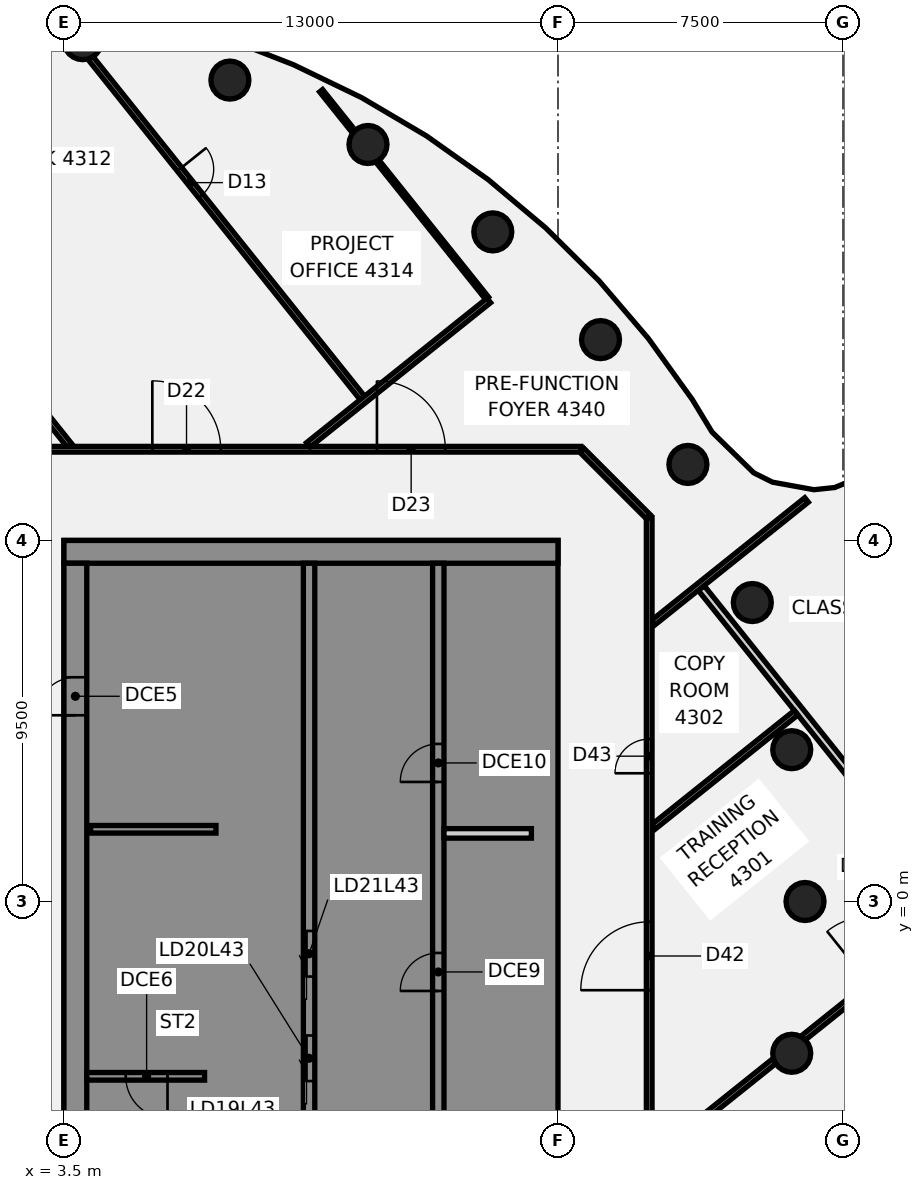
"""IFC4 building model, lengths in metres.
Left out: names, types, materials, properties, quantities, classifications, styles, units other than length and angle.
Written with IfcOpenShell. Run it as: python <this file> out.ifc"""

import sys

from ifc_helpers import new_model, si_unit, direction, frame, frame_2d, origin, origin_2d, place, context, subcontext, project, spatial, polyline, rectangle, circle, outline, extrude, element, fill, save


model = new_model("IFC4")
c1 = context("Model", 3, precision=1e-05, world=origin(), true_north=direction((0.0, 1.0)))
c2 = subcontext(c1, "Body", "Model", "MODEL_VIEW")
j1 = project(units=[si_unit("LENGTHUNIT", "METRE"), si_unit("PLANEANGLEUNIT", "RADIAN")], contexts=[c1])
p1 = place(None, origin())
s1 = spatial("IfcSite", under=j1, at=p1, CompositionType="ELEMENT")
p2 = place(p1, origin())
s2 = spatial("IfcBuilding", under=s1, at=p2, CompositionType="ELEMENT")
p3 = place(p2, frame((0.0, 0.0, 174.25)))
s3 = spatial("IfcBuildingStorey", under=s2, at=p3, CompositionType="ELEMENT", Elevation=174.25)
for number, where, z_axis, x_axis in (
    (1, (23.0, 0.0, -0.14), (0.0, 0.0, 1.0), (1.0, 0.0, 0.0)),
    (2, (22.651, 3.994, -0.14), (0.0, 0.0, 1.0), (1.0, 0.0, 0.0)),
    (3, (21.613, 7.866, -0.14), (0.0, 0.0, 1.0), (1.0, 0.0, 0.0)),
    (4, (19.919, 11.5, -0.14), (0.0, 0.0, 1.0), (1.0, 0.0, 0.0)),
    (5, (17.619, 14.784, -0.14), (0.0, 0.0, 1.0), (1.0, 0.0, 0.0)),
    (6, (14.784, 17.619, -0.14), (0.0, 0.0, 1.0), (1.0, 0.0, 0.0)),
    (7, (11.5, 19.919, -0.14), (0.0, 0.0, 1.0), (1.0, 0.0, 0.0)),
    (8, (7.866, 21.613, -0.14), (0.0, 0.0, 1.0), (1.0, 0.0, 0.0)),
    (9, (3.994, 22.651, -0.14), (0.0, 0.0, 1.0), (1.0, 0.0, 0.0)),
    (10, (22.651, -3.994, -0.14), (0.0, 0.0, 1.0), (1.0, 0.0, 0.0)),
):
    element("IfcColumn", number, at=place(p3, frame(where, z_axis=z_axis, x_axis=x_axis)), inside=s3, PredefinedType="COLUMN", context=c2, shape_type="SweptSolid", body=[
        extrude(circle(Radius=0.5, at=origin_2d()), origin(), (0.0, 0.0, 1.0), 3.71),
    ])
p4 = place(p3, frame((-3.479, 20.906, 0.0), z_axis=(0.0, 0.0, 1.0), x_axis=(0.624627130609, -0.780923138155, 0.0)))
e11 = element("IfcWall", 11, at=p4, inside=s3, PredefinedType="PARTITIONING", context=c2, shape_type="SweptSolid", body=[
    extrude(rectangle(XDim=11.398, YDim=0.15, at=frame_2d((5.699, 0.0))), origin(), (0.0, 0.0, 1.0), 2.97),
])
p5 = place(p4, frame((6.82, 0.0, 0.0)))
e12 = element("IfcOpeningElement", 12, at=p5, cuts=e11, PredefinedType="OPENING", context=c2, shape_type="SweptSolid", body=[
    extrude(rectangle(XDim=0.9, YDim=2.1, at=frame_2d((0.45, 1.05))), frame((0.0, 0.085, 0.0), z_axis=(0.0, -1.0, 0.0), x_axis=(1.0, 0.0, 0.0)), (0.0, 0.0, 1.0), 0.17),
])
p6 = place(p3, frame((4.037, 22.396, 0.0), z_axis=(0.0, 0.0, 1.0), x_axis=(0.624628926241, -0.780921701903, 0.0)))
e13 = element("IfcWall", 13, at=p6, inside=s3, PredefinedType="PARTITIONING", context=c2, shape_type="SweptSolid", body=[
    extrude(rectangle(XDim=11.708, YDim=0.15, at=frame_2d((5.854, 0.0))), origin(), (0.0, 0.0, 1.0), 2.97),
])
p7 = place(p6, frame((4.007, 0.0, 0.0)))
e14 = element("IfcOpeningElement", 14, at=p7, cuts=e13, PredefinedType="OPENING", context=c2, shape_type="SweptSolid", body=[
    extrude(rectangle(XDim=0.9, YDim=2.1, at=frame_2d((0.45, 1.05))), frame((0.0, 0.085, 0.0), z_axis=(0.0, -1.0, 0.0), x_axis=(1.0, 0.0, 0.0)), (0.0, 0.0, 1.0), 0.17),
])
p8 = place(p3, frame((10.266, 21.333, 0.0), z_axis=(0.0, 0.0, 1.0), x_axis=(0.62463072699, -0.780920261551, 0.0)))
e15 = element("IfcWall", 15, at=p8, inside=s3, PredefinedType="PARTITIONING", context=c2, shape_type="SweptSolid", body=[
    extrude(rectangle(XDim=1.389, YDim=0.1, at=frame_2d((0.694, 0.0))), origin(), (0.0, 0.0, 1.0), 2.97),
])
p9 = place(p3, frame((11.752, 19.476, 0.0), z_axis=(0.0, 0.0, 1.0), x_axis=(0.624636960835, -0.780915275276, 0.0)))
e16 = element("IfcWall", 16, at=p9, inside=s3, PredefinedType="PARTITIONING", context=c2, shape_type="SweptSolid", body=[
    extrude(rectangle(XDim=4.613, YDim=0.1, at=frame_2d((2.307, 0.0))), origin(), (0.0, 0.0, 1.0), 2.97),
])
p10 = place(p3, frame((20.27, 8.247, 0.0), z_axis=(0.0, 0.0, 1.0), x_axis=(0.624684578179, -0.780877184828, 0.0)))
e17 = element("IfcWall", 17, at=p10, inside=s3, PredefinedType="PARTITIONING", context=c2, shape_type="SweptSolid", body=[
    extrude(rectangle(XDim=14.219, YDim=0.2, at=frame_2d((7.11, 0.0))), origin(), (0.0, 0.0, 1.0), 2.87),
])
p11 = place(p10, frame((6.92, 0.0, 0.0)))
e18 = element("IfcOpeningElement", 18, at=p11, cuts=e17, PredefinedType="OPENING", context=c2, shape_type="SweptSolid", body=[
    extrude(rectangle(XDim=1.4, YDim=2.1, at=frame_2d((0.7, 1.05))), frame((0.0, 0.11, 0.0), z_axis=(0.0, -1.0, 0.0), x_axis=(1.0, 0.0, 0.0)), (0.0, 0.0, 1.0), 0.22),
])
p12 = place(p3, frame((17.128, 11.872, 0.0), z_axis=(0.0, 0.0, 1.0), x_axis=(0.707106781187, -0.707106781187, 0.0)))
e19 = element("IfcWall", 19, at=p12, inside=s3, PredefinedType="PARTITIONING", context=c2, shape_type="SweptSolid", body=[
    extrude(rectangle(XDim=2.465, YDim=0.15, at=frame_2d((1.232, 0.0))), origin(), (0.0, 0.0, 1.0), 2.97),
])
p13 = place(p3, frame((-17.065, 11.9, 0.0), z_axis=(0.0, 0.0, 1.0), x_axis=(1.0, 0.0, 0.0)))
e20 = element("IfcWall", 20, at=p13, inside=s3, PredefinedType="PARTITIONING", context=c2, shape_type="SweptSolid", body=[
    extrude(rectangle(XDim=34.165, YDim=0.15, at=frame_2d((17.083, 0.0))), origin(), (0.0, 0.0, 1.0), 2.97),
])
p14 = place(p13, frame((22.89, 0.0, 0.0)))
e21 = element("IfcOpeningElement", 21, at=p14, cuts=e20, PredefinedType="OPENING", context=c2, shape_type="SweptSolid", body=[
    extrude(rectangle(XDim=1.8, YDim=2.1, at=frame_2d((0.9, 1.05))), frame((0.0, 0.085, 0.0), z_axis=(0.0, -1.0, 0.0), x_axis=(1.0, 0.0, 0.0)), (0.0, 0.0, 1.0), 0.17),
])
p15 = place(p13, frame((28.801, 0.0, 0.0)))
e22 = element("IfcOpeningElement", 22, at=p15, cuts=e20, PredefinedType="OPENING", context=c2, shape_type="SweptSolid", body=[
    extrude(rectangle(XDim=1.8, YDim=2.1, at=frame_2d((0.9, 1.05))), frame((0.0, 0.085, 0.0), z_axis=(0.0, -1.0, 0.0), x_axis=(1.0, 0.0, 0.0)), (0.0, 0.0, 1.0), 0.17),
])
p16 = place(p13, frame((8.574, 0.0, 0.0)))
e23 = element("IfcOpeningElement", 23, at=p16, cuts=e20, PredefinedType="OPENING", context=c2, shape_type="SweptSolid", body=[
    extrude(rectangle(XDim=1.8, YDim=2.1, at=frame_2d((0.9, 1.05))), frame((0.0, 0.085, 0.0), z_axis=(0.0, -1.0, 0.0), x_axis=(1.0, 0.0, 0.0)), (0.0, 0.0, 1.0), 0.17),
])
p17 = place(p3, frame((9.93, 12.016, 0.0), z_axis=(0.0, 0.0, 1.0), x_axis=(0.780892305739, 0.624665676052, 0.0)))
e24 = element("IfcWall", 24, at=p17, inside=s3, PredefinedType="PARTITIONING", context=c2, shape_type="SweptSolid", body=[
    extrude(rectangle(XDim=6.082, YDim=0.15, at=frame_2d((3.041, 0.0))), origin(), (0.0, 0.0, 1.0), 2.97),
])
p18 = place(p3, frame((19.005, -6.75, 0.0), z_axis=(0.0, 0.0, 1.0), x_axis=(0.780862978875, 0.624702335694, 0.0)))
e25 = element("IfcWall", 25, at=p18, inside=s3, PredefinedType="PARTITIONING", context=c2, shape_type="SweptSolid", body=[
    extrude(rectangle(XDim=4.085, YDim=0.15, at=frame_2d((2.042, 0.0))), origin(), (0.0, 0.0, 1.0), 2.97),
])
p19 = place(p3, frame((22.948, -3.595, 0.0), z_axis=(0.0, 0.0, 1.0), x_axis=(0.780855081302, 0.624712207344, 0.0)))
e26 = element("IfcWall", 26, at=p19, inside=s3, PredefinedType="PARTITIONING", context=c2, shape_type="SweptSolid", body=[
    extrude(rectangle(XDim=5.205, YDim=0.15, at=frame_2d((2.603, 0.0))), origin(), (0.0, 0.0, 1.0), 2.97),
])
p20 = place(p19, frame((2.25, 0.0, 0.0)))
e27 = element("IfcOpeningElement", 27, at=p20, cuts=e26, PredefinedType="OPENING", context=c2, shape_type="SweptSolid", body=[
    extrude(rectangle(XDim=1.8, YDim=2.1, at=frame_2d((0.9, 1.05))), frame((0.0, 0.085, 0.0), z_axis=(0.0, -1.0, 0.0), x_axis=(1.0, 0.0, 0.0)), (0.0, 0.0, 1.0), 0.17),
])
p21 = place(p3, frame((19.005, 1.958, 0.0), z_axis=(0.0, 0.0, 1.0), x_axis=(0.780878701352, 0.624682682468, 0.0)))
e28 = element("IfcWall", 28, at=p21, inside=s3, PredefinedType="PARTITIONING", context=c2, shape_type="SweptSolid", body=[
    extrude(rectangle(XDim=4.816, YDim=0.15, at=frame_2d((2.408, 0.0))), origin(), (0.0, 0.0, 1.0), 2.87),
])
p22 = place(p3, frame((19.005, 7.337, 0.0), z_axis=(0.0, 0.0, 1.0), x_axis=(0.780882638199, 0.624677761217, 0.0)))
e29 = element("IfcWall", 29, at=p22, inside=s3, PredefinedType="PARTITIONING", context=c2, shape_type="SweptSolid", body=[
    extrude(rectangle(XDim=5.167, YDim=0.15, at=frame_2d((2.583, 0.0))), origin(), (0.0, 0.0, 1.0), 2.97),
])
p23 = place(p3, frame((18.9, -10.1, 0.0), z_axis=(0.0, 0.0, 1.0), x_axis=(0.0, 1.0, 0.0)))
e30 = element("IfcWall", 30, at=p23, inside=s3, PredefinedType="PARTITIONING", context=c2, shape_type="SweptSolid", body=[
    extrude(rectangle(XDim=20.2, YDim=0.15, at=frame_2d((10.1, 0.0))), origin(), (0.0, 0.0, 1.0), 2.97),
])
p24 = place(p23, frame((7.766, 0.0, 0.0)))
e31 = element("IfcOpeningElement", 31, at=p24, cuts=e30, PredefinedType="OPENING", context=c2, shape_type="SweptSolid", body=[
    extrude(rectangle(XDim=1.8, YDim=2.1, at=frame_2d((0.9, 1.05))), frame((0.0, 0.085, 0.0), z_axis=(0.0, -1.0, 0.0), x_axis=(1.0, 0.0, 0.0)), (0.0, 0.0, 1.0), 0.17),
])
p25 = place(p23, frame((13.474, 0.0, 0.0)))
e32 = element("IfcOpeningElement", 32, at=p25, cuts=e30, PredefinedType="OPENING", context=c2, shape_type="SweptSolid", body=[
    extrude(rectangle(XDim=0.9, YDim=2.1, at=frame_2d((0.45, 1.05))), frame((0.0, 0.085, 0.0), z_axis=(0.0, -1.0, 0.0), x_axis=(1.0, 0.0, 0.0)), (0.0, 0.0, 1.0), 0.17),
])
p26 = place(p3, origin())
e33 = element("IfcWall", 33, at=p26, inside=s3, PredefinedType="SHEAR", context=c2, shape_type="SweptSolid", body=[
    extrude(outline(polyline([(13.5, -8.125), (13.5, -8.9), (15.9, -8.9), (16.5, -8.9), (16.5, 8.9), (15.9, 8.9), (13.5, 8.9), (13.5, 8.125), (15.9, 8.125), (15.9, 5.625), (13.5, 5.625), (13.5, 5.375), (15.9, 5.375), (15.9, -5.375), (13.5, -5.375), (13.5, -5.625), (15.9, -5.625), (15.9, -8.125), (13.5, -8.125)])), origin(), (0.0, 0.0, 1.0), 3.57),
])
p27 = place(p3, frame((16.5, 9.2, 0.0), z_axis=(0.0, 0.0, 1.0), x_axis=(-1.0, 0.0, 0.0)))
e34 = element("IfcWall", 34, at=p27, inside=s3, PredefinedType="SHEAR", context=c2, shape_type="SweptSolid", body=[
    extrude(rectangle(XDim=13.0, YDim=0.6, at=frame_2d((6.5, 0.0))), origin(), (0.0, 0.0, 1.0), 3.57),
])
p28 = place(p3, origin())
e35 = element("IfcWall", 35, at=p28, inside=s3, PredefinedType="SHEAR", context=c2, shape_type="SweptSolid", body=[
    extrude(outline(polyline([(9.8, -5.375), (7.5, -5.375), (7.5, -2.875), (9.8, -2.875), (9.8, -2.625), (7.5, -2.625), (7.5, -0.125), (9.8, -0.125), (9.8, 0.125), (7.5, 0.125), (7.5, 2.625), (9.8, 2.625), (9.8, 2.875), (7.5, 2.875), (7.5, 5.375), (9.8, 5.375), (9.8, 5.625), (7.5, 5.625), (7.5, 8.125), (9.8, 8.125), (9.8, 8.9), (7.5, 8.9), (7.2, 8.9), (7.2, -5.625), (7.5, -5.625), (9.8, -5.625), (9.8, -5.375)])), origin(), (0.0, 0.0, 1.0), 3.57),
])
p29 = place(p3, frame((7.5, 1.9, 0.0), z_axis=(0.0, 0.0, 1.0), x_axis=(-1.0, 0.0, 0.0)))
e36 = element("IfcWall", 36, at=p29, inside=s3, PredefinedType="SHEAR", context=c2, shape_type="SweptSolid", body=[
    extrude(rectangle(XDim=3.3, YDim=0.2, at=frame_2d((1.65, 0.0))), origin(), (0.0, 0.0, 1.0), 3.57),
])
p30 = place(p3, frame((13.35, -8.9, 0.0), z_axis=(0.0, 0.0, 1.0), x_axis=(0.0, 1.0, 0.0)))
e37 = element("IfcWall", 37, at=p30, inside=s3, PredefinedType="SHEAR", context=c2, shape_type="SweptSolid", body=[
    extrude(rectangle(XDim=17.8, YDim=0.3, at=frame_2d((8.9, 0.0))), origin(), (0.0, 0.0, 1.0), 3.57),
])
p31 = place(p30, frame((1.325, 0.0, 0.0)))
e38 = element("IfcOpeningElement", 38, at=p31, cuts=e37, PredefinedType="OPENING", context=c2, shape_type="SweptSolid", body=[
    extrude(rectangle(XDim=1.4, YDim=2.1, at=frame_2d((0.7, 1.05))), frame((0.0, 0.16, 0.0), z_axis=(0.0, -1.0, 0.0), x_axis=(1.0, 0.0, 0.0)), (0.0, 0.0, 1.0), 0.32),
])
p32 = place(p30, frame((6.546, 0.0, 0.0)))
e39 = element("IfcOpeningElement", 39, at=p32, cuts=e37, PredefinedType="OPENING", context=c2, shape_type="SweptSolid", body=[
    extrude(rectangle(XDim=1.0, YDim=2.1, at=frame_2d((0.5, 1.05))), frame((0.0, 0.16, 0.0), z_axis=(0.0, -1.0, 0.0), x_axis=(1.0, 0.0, 0.0)), (0.0, 0.0, 1.0), 0.32),
])
p33 = place(p30, frame((12.046, 0.0, 0.0)))
e40 = element("IfcOpeningElement", 40, at=p33, cuts=e37, PredefinedType="OPENING", context=c2, shape_type="SweptSolid", body=[
    extrude(rectangle(XDim=1.0, YDim=2.1, at=frame_2d((0.5, 1.05))), frame((0.0, 0.16, 0.0), z_axis=(0.0, -1.0, 0.0), x_axis=(1.0, 0.0, 0.0)), (0.0, 0.0, 1.0), 0.32),
])
p34 = place(p3, frame((9.95, -8.9, 0.0), z_axis=(0.0, 0.0, 1.0), x_axis=(0.0, 1.0, 0.0)))
e41 = element("IfcWall", 41, at=p34, inside=s3, PredefinedType="SHEAR", context=c2, shape_type="SweptSolid", body=[
    extrude(rectangle(XDim=17.8, YDim=0.3, at=frame_2d((8.9, 0.0))), origin(), (0.0, 0.0, 1.0), 3.57),
])
p35 = place(p34, frame((4.175, 0.0, 0.0)))
e42 = element("IfcOpeningElement", 42, at=p35, cuts=e41, PredefinedType="OPENING", context=c2, shape_type="SweptSolid", body=[
    extrude(rectangle(XDim=1.2, YDim=2.1, at=frame_2d((0.6, 1.05))), frame((0.0, 0.16, 0.0), z_axis=(0.0, -1.0, 0.0), x_axis=(1.0, 0.0, 0.0)), (0.0, 0.0, 1.0), 0.32),
])
p36 = place(p34, frame((6.925, 0.0, 0.0)))
e43 = element("IfcOpeningElement", 43, at=p36, cuts=e41, PredefinedType="OPENING", context=c2, shape_type="SweptSolid", body=[
    extrude(rectangle(XDim=1.2, YDim=2.1, at=frame_2d((0.6, 1.05))), frame((0.0, 0.16, 0.0), z_axis=(0.0, -1.0, 0.0), x_axis=(1.0, 0.0, 0.0)), (0.0, 0.0, 1.0), 0.32),
])
p37 = place(p3, frame((3.8, -8.9, 0.0), z_axis=(0.0, 0.0, 1.0), x_axis=(0.0, 1.0, 0.0)))
e44 = element("IfcWall", 44, at=p37, inside=s3, PredefinedType="SHEAR", context=c2, shape_type="SweptSolid", body=[
    extrude(rectangle(XDim=17.8, YDim=0.6, at=frame_2d((8.9, 0.0))), origin(), (0.0, 0.0, 1.0), 3.57),
])
p38 = place(p37, frame((1.25, 0.0, 0.0)))
e45 = element("IfcOpeningElement", 45, at=p38, cuts=e44, PredefinedType="OPENING", context=c2, shape_type="SweptSolid", body=[
    extrude(rectangle(XDim=1.8, YDim=2.1, at=frame_2d((0.9, 1.05))), frame((0.0, 0.31, 0.0), z_axis=(0.0, -1.0, 0.0), x_axis=(1.0, 0.0, 0.0)), (0.0, 0.0, 1.0), 0.62),
])
p39 = place(p37, frame((13.8, 0.0, 0.0)))
e46 = element("IfcOpeningElement", 46, at=p39, cuts=e44, PredefinedType="OPENING", context=c2, shape_type="SweptSolid", body=[
    extrude(rectangle(XDim=1.0, YDim=2.1, at=frame_2d((0.5, 1.05))), frame((0.0, 0.31, 0.0), z_axis=(0.0, -1.0, 0.0), x_axis=(1.0, 0.0, 0.0)), (0.0, 0.0, 1.0), 0.62),
])
p40 = place(p3, frame((7.2, -4.6, 0.0), z_axis=(0.0, 0.0, 1.0), x_axis=(-1.0, 0.0, 0.0)))
e47 = element("IfcWall", 47, at=p40, inside=s3, PredefinedType="SHEAR", context=c2, shape_type="SweptSolid", body=[
    extrude(rectangle(XDim=3.1, YDim=0.2, at=frame_2d((1.55, 0.0))), origin(), (0.0, 0.0, 1.0), 3.57),
])
p41 = place(p40, frame((0.975, 0.0, 0.0)))
e48 = element("IfcOpeningElement", 48, at=p41, cuts=e47, PredefinedType="OPENING", context=c2, shape_type="SweptSolid", body=[
    extrude(rectangle(XDim=1.1, YDim=2.1, at=frame_2d((0.55, 1.05))), frame((0.0, 0.11, 0.0), z_axis=(0.0, -1.0, 0.0), x_axis=(1.0, 0.0, 0.0)), (0.0, 0.0, 1.0), 0.22),
])
p42 = place(p3, frame((15.8, 1.792, 0.0), z_axis=(0.0, 0.0, 1.0), x_axis=(-1.0, 0.0, 0.0)))
e49 = element("IfcWall", 49, at=p42, inside=s3, PredefinedType="PARTITIONING", context=c2, shape_type="SweptSolid", body=[
    extrude(rectangle(XDim=2.3, YDim=0.25, at=frame_2d((1.15, 0.0))), origin(), (0.0, 0.0, 1.0), 3.57),
])
p43 = place(p7, origin())
e50 = element("IfcDoor", 50, at=p43, inside=s3, OperationType="SINGLE_SWING_RIGHT", PredefinedType="DOOR", context=c2, shape_type="SweptSolid", body=[
    extrude(rectangle(XDim=0.9, YDim=2.1, at=frame_2d((0.45, 1.05))), frame((0.0, 0.025, 0.0), z_axis=(0.0, -1.0, 0.0), x_axis=(1.0, 0.0, 0.0)), (0.0, 0.0, 1.0), 0.05),
])
fill(e14, e50)
p44 = place(p14, frame((1.8, 0.0, 0.0), z_axis=(0.0, 0.0, 1.0), x_axis=(-1.0, 0.0, 0.0)))
e51 = element("IfcDoor", 51, at=p44, inside=s3, OperationType="DOUBLE_DOOR_SINGLE_SWING", PredefinedType="DOOR", context=c2, shape_type="SweptSolid", body=[
    extrude(rectangle(XDim=1.8, YDim=2.1, at=frame_2d((0.9, 1.05))), frame((0.0, 0.025, 0.0), z_axis=(0.0, -1.0, 0.0), x_axis=(1.0, 0.0, 0.0)), (0.0, 0.0, 1.0), 0.05),
])
fill(e21, e51)
p45 = place(p15, origin())
e52 = element("IfcDoor", 52, at=p45, inside=s3, OperationType="DOUBLE_DOOR_SINGLE_SWING", PredefinedType="DOOR", context=c2, shape_type="SweptSolid", body=[
    extrude(rectangle(XDim=1.8, YDim=2.1, at=frame_2d((0.9, 1.05))), frame((0.0, 0.025, 0.0), z_axis=(0.0, -1.0, 0.0), x_axis=(1.0, 0.0, 0.0)), (0.0, 0.0, 1.0), 0.05),
])
fill(e22, e52)
p46 = place(p24, origin())
e53 = element("IfcDoor", 53, at=p46, inside=s3, OperationType="DOUBLE_DOOR_SINGLE_SWING", PredefinedType="DOOR", context=c2, shape_type="SweptSolid", body=[
    extrude(rectangle(XDim=1.8, YDim=2.1, at=frame_2d((0.9, 1.05))), frame((0.0, 0.025, 0.0), z_axis=(0.0, -1.0, 0.0), x_axis=(1.0, 0.0, 0.0)), (0.0, 0.0, 1.0), 0.05),
])
fill(e31, e53)
p47 = place(p25, frame((0.9, 0.0, 0.0), z_axis=(0.0, 0.0, 1.0), x_axis=(-1.0, 0.0, 0.0)))
e54 = element("IfcDoor", 54, at=p47, inside=s3, OperationType="SINGLE_SWING_RIGHT", PredefinedType="DOOR", context=c2, shape_type="SweptSolid", body=[
    extrude(rectangle(XDim=0.9, YDim=2.1, at=frame_2d((0.45, 1.05))), frame((0.0, 0.025, 0.0), z_axis=(0.0, -1.0, 0.0), x_axis=(1.0, 0.0, 0.0)), (0.0, 0.0, 1.0), 0.05),
])
fill(e32, e54)
p48 = place(p39, origin())
e55 = element("IfcDoor", 55, at=p48, inside=s3, OperationType="SINGLE_SWING_LEFT", PredefinedType="DOOR", context=c2, shape_type="SweptSolid", body=[
    extrude(rectangle(XDim=1.0, YDim=2.1, at=frame_2d((0.5, 1.05))), frame((0.0, 0.025, 0.0), z_axis=(0.0, -1.0, 0.0), x_axis=(1.0, 0.0, 0.0)), (0.0, 0.0, 1.0), 0.05),
])
fill(e46, e55)
p49 = place(p41, origin())
e56 = element("IfcDoor", 56, at=p49, inside=s3, OperationType="SINGLE_SWING_LEFT", PredefinedType="DOOR", context=c2, shape_type="SweptSolid", body=[
    extrude(rectangle(XDim=1.1, YDim=2.1, at=frame_2d((0.55, 1.05))), frame((0.0, 0.025, 0.0), z_axis=(0.0, -1.0, 0.0), x_axis=(1.0, 0.0, 0.0)), (0.0, 0.0, 1.0), 0.05),
])
fill(e48, e56)
p50 = place(p35, origin())
e57 = element("IfcDoor", 57, at=p50, inside=s3, OperationType="SLIDING_TO_LEFT", PredefinedType="DOOR", context=c2, shape_type="SweptSolid", body=[
    extrude(rectangle(XDim=1.2, YDim=2.1, at=frame_2d((0.6, 1.05))), frame((0.0, 0.025, 0.0), z_axis=(0.0, -1.0, 0.0), x_axis=(1.0, 0.0, 0.0)), (0.0, 0.0, 1.0), 0.05),
])
fill(e42, e57)
p51 = place(p36, origin())
e58 = element("IfcDoor", 58, at=p51, inside=s3, OperationType="SLIDING_TO_LEFT", PredefinedType="DOOR", context=c2, shape_type="SweptSolid", body=[
    extrude(rectangle(XDim=1.2, YDim=2.1, at=frame_2d((0.6, 1.05))), frame((0.0, 0.025, 0.0), z_axis=(0.0, -1.0, 0.0), x_axis=(1.0, 0.0, 0.0)), (0.0, 0.0, 1.0), 0.05),
])
fill(e43, e58)
p52 = place(p32, origin())
e59 = element("IfcDoor", 59, at=p52, inside=s3, OperationType="SINGLE_SWING_LEFT", PredefinedType="DOOR", context=c2, shape_type="SweptSolid", body=[
    extrude(rectangle(XDim=1.0, YDim=2.1, at=frame_2d((0.5, 1.05))), frame((0.0, 0.025, 0.0), z_axis=(0.0, -1.0, 0.0), x_axis=(1.0, 0.0, 0.0)), (0.0, 0.0, 1.0), 0.05),
])
fill(e39, e59)
p53 = place(p33, origin())
e60 = element("IfcDoor", 60, at=p53, inside=s3, OperationType="SINGLE_SWING_LEFT", PredefinedType="DOOR", context=c2, shape_type="SweptSolid", body=[
    extrude(rectangle(XDim=1.0, YDim=2.1, at=frame_2d((0.5, 1.05))), frame((0.0, 0.025, 0.0), z_axis=(0.0, -1.0, 0.0), x_axis=(1.0, 0.0, 0.0)), (0.0, 0.0, 1.0), 0.05),
])
fill(e40, e60)
save(model, sys.argv[1])
